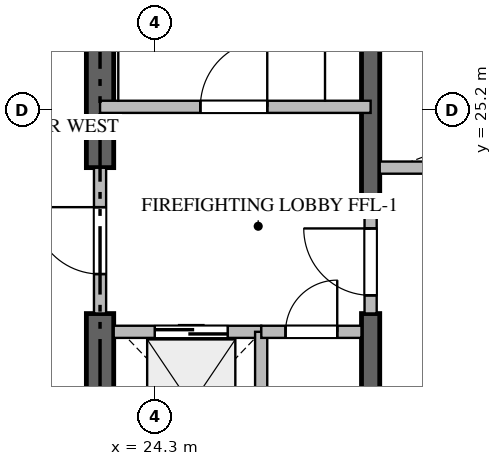
"""IFC4 building model, lengths in metres.
Left out: names, types, materials, properties, quantities, classifications, styles, units other than length and angle.
Written with IfcOpenShell. Run it as: python <this file> out.ifc"""

import sys

from ifc_helpers import new_model, si_unit, direction, frame, frame_2d, origin, place, context, subcontext, project, spatial, rectangle, extrude, source, transform, mapped, element, fill, save


model = new_model("IFC4")
c1 = context("Model", 3, precision=1e-05, world=origin(), true_north=direction((0.0, 1.0)))
c2 = subcontext(c1, "Body", "Model", "MODEL_VIEW")
j1 = project(units=[si_unit("LENGTHUNIT", "METRE"), si_unit("PLANEANGLEUNIT", "RADIAN")], contexts=[c1])
p1 = place(None, origin())
s1 = spatial("IfcSite", under=j1, at=p1, CompositionType="ELEMENT")
p2 = place(p1, origin())
s2 = spatial("IfcBuilding", under=s1, at=p2, CompositionType="ELEMENT")
p3 = place(p2, frame((0.0, 0.0, 105.45)))
s3 = spatial("IfcBuildingStorey", under=s2, at=p3, CompositionType="ELEMENT", Elevation=105.45)
p4 = place(p3, frame((23.4, 17.025, -0.26), z_axis=(0.0, 0.0, 1.0), x_axis=(0.0, 1.0, 0.0)))
e1 = element("IfcWall", 1, at=p4, inside=s3, PredefinedType="SHEAR", context=c2, shape_type="SweptSolid", body=[
    extrude(rectangle(XDim=4.825, YDim=0.45, at=frame_2d((2.413, 0.0))), origin(), (0.0, 0.0, 1.0), 3.648),
])
p5 = place(p3, frame((23.4, 24.25, -0.26), z_axis=(0.0, 0.0, 1.0), x_axis=(0.0, 1.0, 0.0)))
e2 = element("IfcWall", 2, at=p5, inside=s3, PredefinedType="SHEAR", context=c2, shape_type="SweptSolid", body=[
    extrude(rectangle(XDim=9.125, YDim=0.45, at=frame_2d((4.562, 0.0))), origin(), (0.0, 0.0, 1.0), 3.648),
])
p6 = place(p3, frame((27.85, 17.025, -0.26), z_axis=(0.0, 0.0, 1.0), x_axis=(0.0, 1.0, 0.0)))
e3 = element("IfcWall", 3, at=p6, inside=s3, PredefinedType="SHEAR", context=c2, shape_type="SweptSolid", body=[
    extrude(rectangle(XDim=4.825, YDim=0.3, at=frame_2d((2.413, 0.0))), origin(), (0.0, 0.0, 1.0), 3.648),
])
p7 = place(p3, frame((27.85, 23.55, -0.26), z_axis=(0.0, 0.0, 1.0), x_axis=(0.0, 1.0, 0.0)))
e4 = element("IfcWall", 4, at=p7, inside=s3, PredefinedType="SHEAR", context=c2, shape_type="SweptSolid", body=[
    extrude(rectangle(XDim=9.825, YDim=0.3, at=frame_2d((4.913, 0.0))), origin(), (0.0, 0.0, 1.0), 3.648),
])
p8 = place(p3, frame((23.4, 25.25, 0.0), z_axis=(0.0, 0.0, 1.0), x_axis=(1.0, 0.0, 0.0)))
e5 = element("IfcWall", 5, at=p8, inside=s3, PredefinedType="STANDARD", context=c2, shape_type="SweptSolid", body=[
    extrude(rectangle(XDim=4.45, YDim=0.2, at=frame_2d((2.225, 0.0))), origin(), (0.0, 0.0, 1.0), 3.39),
])
p9 = place(p8, frame((1.65, 0.0, 0.0)))
e6 = element("IfcOpeningElement", 6, at=p9, cuts=e5, PredefinedType="OPENING", context=c2, shape_type="SweptSolid", body=[
    extrude(rectangle(XDim=1.1, YDim=2.15, at=frame_2d((0.55, 1.075))), frame((0.0, 0.11, 0.0), z_axis=(0.0, -1.0, 0.0), x_axis=(1.0, 0.0, 0.0)), (0.0, 0.0, 1.0), 0.22),
])
p10 = place(p3, frame((23.625, 21.55, 0.0), z_axis=(0.0, 0.0, 1.0), x_axis=(1.0, 0.0, 0.0)))
e7 = element("IfcWall", 7, at=p10, inside=s3, PredefinedType="STANDARD", context=c2, shape_type="SweptSolid", body=[
    extrude(rectangle(XDim=2.425, YDim=0.2, at=frame_2d((1.212, 0.0))), origin(), (0.0, 0.0, 1.0), 3.39),
])
p11 = place(p10, frame((0.675, 0.0, 0.0)))
e8 = element("IfcOpeningElement", 8, at=p11, cuts=e7, PredefinedType="OPENING", context=c2, shape_type="SweptSolid", body=[
    extrude(rectangle(XDim=1.2, YDim=2.2, at=frame_2d((0.6, 1.1))), frame((0.0, 0.11, 0.0), z_axis=(0.0, -1.0, 0.0), x_axis=(1.0, 0.0, 0.0)), (0.0, 0.0, 1.0), 0.22),
])
p12 = place(p3, frame((28.0, 24.25, 0.0), z_axis=(0.0, 0.0, 1.0), x_axis=(1.0, 0.0, 0.0)))
e9 = element("IfcWall", 9, at=p12, inside=s3, PredefinedType="STANDARD", context=c2, shape_type="SweptSolid", body=[
    extrude(rectangle(XDim=2.425, YDim=0.2, at=frame_2d((1.212, 0.0))), origin(), (0.0, 0.0, 1.0), 3.39),
])
p13 = place(p3, frame((26.05, 19.05, 0.0), z_axis=(0.0, 0.0, 1.0), x_axis=(0.0, 1.0, 0.0)))
e10 = element("IfcWall", 10, at=p13, inside=s3, PredefinedType="STANDARD", context=c2, shape_type="SweptSolid", body=[
    extrude(rectangle(XDim=2.5, YDim=0.2, at=frame_2d((1.25, 0.0))), origin(), (0.0, 0.0, 1.0), 3.39),
])
p14 = place(p3, frame((26.052, 21.55, 0.0), z_axis=(0.0, 0.0, 1.0), x_axis=(1.0, 0.0, 0.0)))
e11 = element("IfcWall", 11, at=p14, inside=s3, PredefinedType="STANDARD", context=c2, shape_type="SweptSolid", body=[
    extrude(rectangle(XDim=1.648, YDim=0.2, at=frame_2d((0.824, 0.0))), origin(), (0.0, 0.0, 1.0), 3.39),
])
p15 = place(p14, frame((0.399, 0.0, 0.0)))
e12 = element("IfcOpeningElement", 12, at=p15, cuts=e11, PredefinedType="OPENING", context=c2, shape_type="SweptSolid", body=[
    extrude(rectangle(XDim=0.85, YDim=2.1, at=frame_2d((0.425, 1.05))), frame((0.0, 0.11, 0.0), z_axis=(0.0, -1.0, 0.0), x_axis=(1.0, 0.0, 0.0)), (0.0, 0.0, 1.0), 0.22),
])
p16 = place(p3, frame((23.4, 21.852, 0.0), z_axis=(0.0, 0.0, 1.0), x_axis=(0.0, 1.0, 0.0)))
e13 = element("IfcWall", 13, at=p16, inside=s3, PredefinedType="STANDARD", context=c2, shape_type="SweptSolid", body=[
    extrude(rectangle(XDim=2.396, YDim=0.2, at=frame_2d((1.198, 0.0))), origin(), (0.0, 0.0, 1.0), 3.39),
])
p17 = place(p16, frame((0.648, 0.0, 0.0)))
e14 = element("IfcOpeningElement", 14, at=p17, cuts=e13, PredefinedType="OPENING", context=c2, shape_type="SweptSolid", body=[
    extrude(rectangle(XDim=1.1, YDim=2.15, at=frame_2d((0.55, 1.075))), frame((0.0, 0.11, 0.0), z_axis=(0.0, -1.0, 0.0), x_axis=(1.0, 0.0, 0.0)), (0.0, 0.0, 1.0), 0.22),
])
p18 = place(p3, frame((27.85, 21.852, 0.0), z_axis=(0.0, 0.0, 1.0), x_axis=(0.0, 1.0, 0.0)))
e15 = element("IfcWall", 15, at=p18, inside=s3, PredefinedType="STANDARD", context=c2, shape_type="SweptSolid", body=[
    extrude(rectangle(XDim=1.696, YDim=0.2, at=frame_2d((0.848, 0.0))), origin(), (0.0, 0.0, 1.0), 3.39),
])
p19 = place(p18, frame((0.298, 0.0, 0.0)))
e16 = element("IfcOpeningElement", 16, at=p19, cuts=e15, PredefinedType="OPENING", context=c2, shape_type="SweptSolid", body=[
    extrude(rectangle(XDim=1.1, YDim=2.15, at=frame_2d((0.55, 1.075))), frame((0.0, 0.11, 0.0), z_axis=(0.0, -1.0, 0.0), x_axis=(1.0, 0.0, 0.0)), (0.0, 0.0, 1.0), 0.22),
])
m1 = source(origin(), c2, "Body", "SweptSolid", [
    extrude(rectangle(XDim=1.1, YDim=2.15, at=frame_2d((0.55, 1.075))), frame((0.0, 0.025, 0.0), z_axis=(0.0, -1.0, 0.0), x_axis=(1.0, 0.0, 0.0)), (0.0, 0.0, 1.0), 0.05),
])
p20 = place(p9, origin())
e17 = element("IfcDoor", 17, at=p20, inside=s3, OperationType="SINGLE_SWING_RIGHT", PredefinedType="DOOR", context=c2, shape_type="MappedRepresentation", body=[
    mapped(m1, transform((0.0, 0.0, 0.0), scale=1.0)),
])
fill(e6, e17)
m2 = source(origin(), c2, "Body", "SweptSolid", [
    extrude(rectangle(XDim=1.2, YDim=2.2, at=frame_2d((0.6, 1.1))), frame((0.0, 0.025, 0.0), z_axis=(0.0, -1.0, 0.0), x_axis=(1.0, 0.0, 0.0)), (0.0, 0.0, 1.0), 0.05),
])
p21 = place(p11, origin())
e18 = element("IfcDoor", 18, at=p21, inside=s3, OperationType="DOUBLE_DOOR_SLIDING", PredefinedType="DOOR", context=c2, shape_type="MappedRepresentation", body=[
    mapped(m2, transform((0.0, 0.0, 0.0), scale=1.0)),
])
fill(e8, e18)
m3 = source(origin(), c2, "Body", "SweptSolid", [
    extrude(rectangle(XDim=0.85, YDim=2.1, at=frame_2d((0.425, 1.05))), frame((0.0, 0.025, 0.0), z_axis=(0.0, -1.0, 0.0), x_axis=(1.0, 0.0, 0.0)), (0.0, 0.0, 1.0), 0.05),
])
p22 = place(p15, origin())
e19 = element("IfcDoor", 19, at=p22, inside=s3, OperationType="SINGLE_SWING_RIGHT", PredefinedType="DOOR", context=c2, shape_type="MappedRepresentation", body=[
    mapped(m3, transform((0.0, 0.0, 0.0), scale=1.0)),
])
fill(e12, e19)
p23 = place(p17, origin())
e20 = element("IfcDoor", 20, at=p23, inside=s3, OperationType="SINGLE_SWING_RIGHT", PredefinedType="DOOR", context=c2, shape_type="MappedRepresentation", body=[
    mapped(m1, transform((0.0, 0.0, 0.0), scale=1.0)),
])
fill(e14, e20)
p24 = place(p19, origin())
e21 = element("IfcDoor", 21, at=p24, inside=s3, OperationType="SINGLE_SWING_RIGHT", PredefinedType="DOOR", context=c2, shape_type="MappedRepresentation", body=[
    mapped(m1, transform((0.0, 0.0, 0.0), scale=1.0)),
])
fill(e16, e21)
save(model, sys.argv[1])
